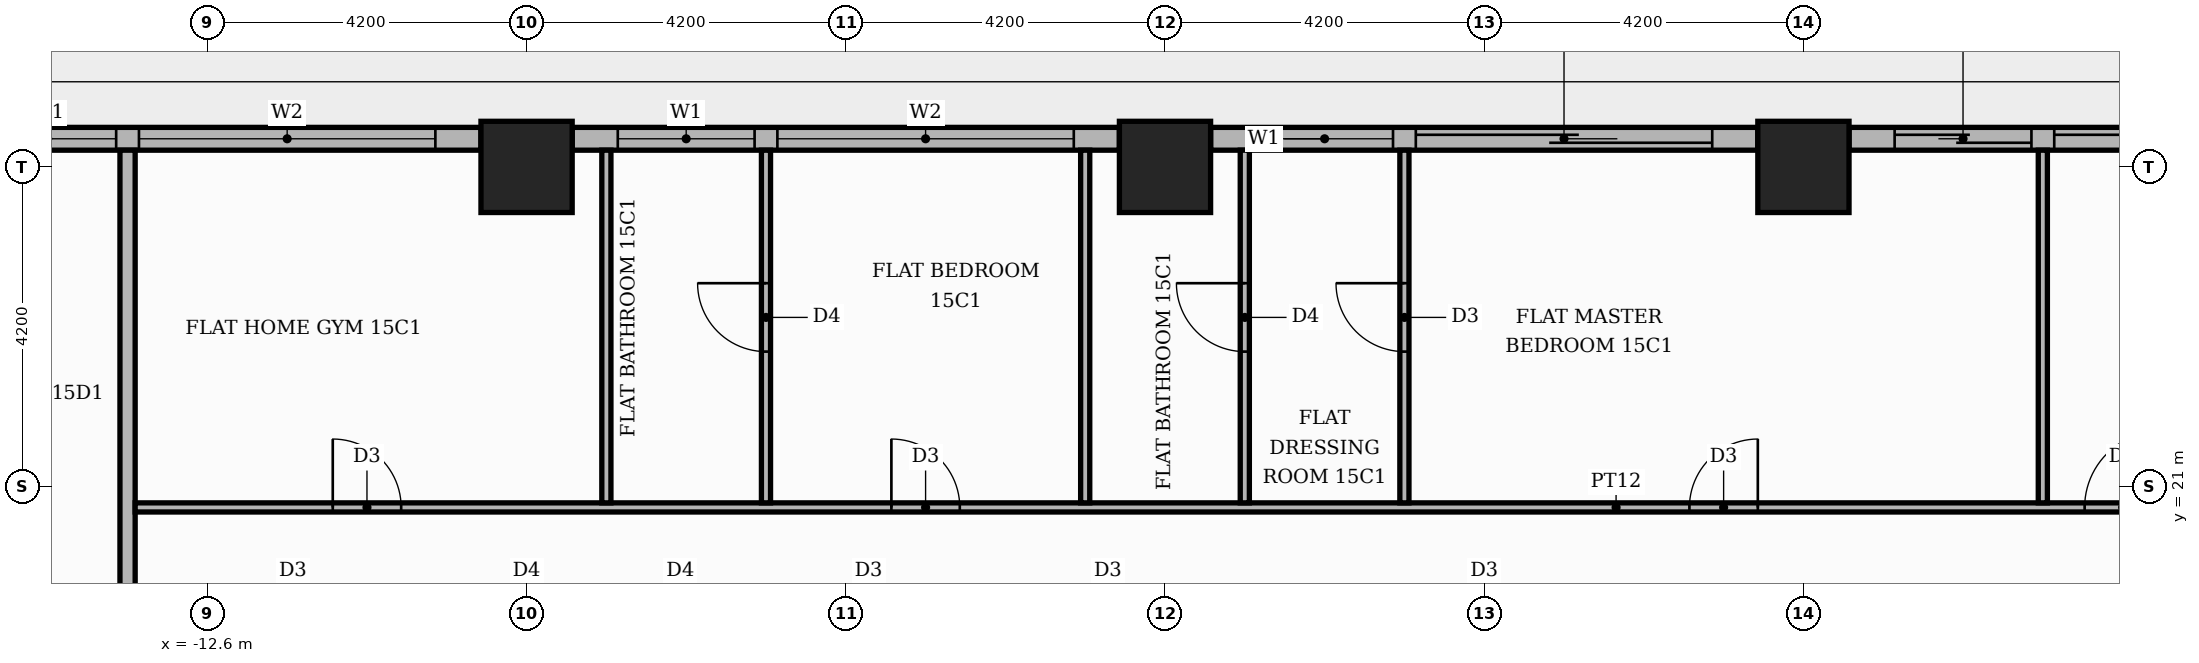
"""IFC4 building model, lengths in metres.
Left out: names, types, materials, properties, quantities, classifications, styles, units other than length and angle.
Written with IfcOpenShell. Run it as: python <this file> out.ifc"""

import sys

from ifc_helpers import new_model, si_unit, direction, frame, frame_2d, origin, origin_2d, place, context, subcontext, project, spatial, rectangle, extrude, element, fill, save


model = new_model("IFC4")
c1 = context("Model", 3, precision=1e-05, world=origin(), true_north=direction((0.0, 1.0)))
c2 = subcontext(c1, "Body", "Model", "MODEL_VIEW")
j1 = project(units=[si_unit("LENGTHUNIT", "METRE"), si_unit("PLANEANGLEUNIT", "RADIAN")], contexts=[c1])
p1 = place(None, origin())
s1 = spatial("IfcSite", under=j1, at=p1, CompositionType="ELEMENT")
p2 = place(p1, origin())
s2 = spatial("IfcBuilding", under=s1, at=p2, CompositionType="ELEMENT")
p3 = place(p2, frame((0.0, 0.0, 66.0)))
s3 = spatial("IfcBuildingStorey", under=s2, at=p3, CompositionType="ELEMENT", Elevation=66.0)
for number, where, z_axis, x_axis in (
    (1, (0.0, 25.2, 0.0), (0.0, 0.0, 1.0), (1.0, 0.0, 0.0)),
    (2, (-8.4, 25.2, 0.0), (0.0, 0.0, 1.0), (1.0, 0.0, 0.0)),
    (3, (8.4, 25.2, 0.0), (0.0, 0.0, 1.0), (1.0, 0.0, 0.0)),
):
    element("IfcColumn", number, at=place(p3, frame(where, z_axis=z_axis, x_axis=x_axis)), inside=s3, PredefinedType="COLUMN", context=c2, shape_type="SweptSolid", body=[
        extrude(rectangle(XDim=1.2, YDim=1.2, at=origin_2d()), origin(), (0.0, 0.0, 1.0), 3.9),
    ])
p4 = place(p3, frame((16.2, 25.57, 0.0), z_axis=(0.0, 0.0, 1.0), x_axis=(-1.0, 0.0, 0.0)))
e4 = element("IfcWall", 4, at=p4, inside=s3, PredefinedType="STANDARD", context=c2, shape_type="SweptSolid", body=[
    extrude(rectangle(XDim=7.2, YDim=0.3, at=frame_2d((3.6, 0.0))), origin(), (0.0, 0.0, 1.0), 3.48),
])
p5 = place(p4, frame((0.6, 0.0, 0.0)))
e5 = element("IfcOpeningElement", 5, at=p5, cuts=e4, PredefinedType="OPENING", context=c2, shape_type="SweptSolid", body=[
    extrude(rectangle(XDim=3.9, YDim=2.4, at=frame_2d((1.95, 1.2))), frame((0.0, 0.16, 0.0), z_axis=(0.0, -1.0, 0.0), x_axis=(1.0, 0.0, 0.0)), (0.0, 0.0, 1.0), 0.32),
])
p6 = place(p4, frame((4.8, 0.0, 0.0)))
e6 = element("IfcOpeningElement", 6, at=p6, cuts=e4, PredefinedType="OPENING", context=c2, shape_type="SweptSolid", body=[
    extrude(rectangle(XDim=1.8, YDim=2.4, at=frame_2d((0.9, 1.2))), frame((0.0, 0.16, 0.0), z_axis=(0.0, -1.0, 0.0), x_axis=(1.0, 0.0, 0.0)), (0.0, 0.0, 1.0), 0.32),
])
p7 = place(p3, frame((7.8, 25.57, 0.0), z_axis=(0.0, 0.0, 1.0), x_axis=(-1.0, 0.0, 0.0)))
e7 = element("IfcWall", 7, at=p7, inside=s3, PredefinedType="STANDARD", context=c2, shape_type="SweptSolid", body=[
    extrude(rectangle(XDim=7.2, YDim=0.3, at=frame_2d((3.6, 0.0))), origin(), (0.0, 0.0, 1.0), 3.48),
])
p8 = place(p7, frame((0.6, 0.0, 0.0)))
e8 = element("IfcOpeningElement", 8, at=p8, cuts=e7, PredefinedType="OPENING", context=c2, shape_type="SweptSolid", body=[
    extrude(rectangle(XDim=3.9, YDim=2.4, at=frame_2d((1.95, 1.2))), frame((0.0, 0.16, 0.0), z_axis=(0.0, -1.0, 0.0), x_axis=(1.0, 0.0, 0.0)), (0.0, 0.0, 1.0), 0.32),
])
p9 = place(p7, frame((4.8, 0.0, 0.9)))
e9 = element("IfcOpeningElement", 9, at=p9, cuts=e7, PredefinedType="OPENING", context=c2, shape_type="SweptSolid", body=[
    extrude(rectangle(XDim=1.8, YDim=2.1, at=frame_2d((0.9, 1.05))), frame((0.0, 0.16, 0.0), z_axis=(0.0, -1.0, 0.0), x_axis=(1.0, 0.0, 0.0)), (0.0, 0.0, 1.0), 0.32),
])
p10 = place(p3, frame((-0.6, 25.57, 0.0), z_axis=(0.0, 0.0, 1.0), x_axis=(-1.0, 0.0, 0.0)))
e10 = element("IfcWall", 10, at=p10, inside=s3, PredefinedType="STANDARD", context=c2, shape_type="SweptSolid", body=[
    extrude(rectangle(XDim=7.2, YDim=0.3, at=frame_2d((3.6, 0.0))), origin(), (0.0, 0.0, 1.0), 3.48),
])
p11 = place(p10, frame((0.6, 0.0, 0.9)))
e11 = element("IfcOpeningElement", 11, at=p11, cuts=e10, PredefinedType="OPENING", context=c2, shape_type="SweptSolid", body=[
    extrude(rectangle(XDim=3.9, YDim=2.1, at=frame_2d((1.95, 1.05))), frame((0.0, 0.16, 0.0), z_axis=(0.0, -1.0, 0.0), x_axis=(1.0, 0.0, 0.0)), (0.0, 0.0, 1.0), 0.32),
])
p12 = place(p10, frame((4.8, 0.0, 0.9)))
e12 = element("IfcOpeningElement", 12, at=p12, cuts=e10, PredefinedType="OPENING", context=c2, shape_type="SweptSolid", body=[
    extrude(rectangle(XDim=1.8, YDim=2.1, at=frame_2d((0.9, 1.05))), frame((0.0, 0.16, 0.0), z_axis=(0.0, -1.0, 0.0), x_axis=(1.0, 0.0, 0.0)), (0.0, 0.0, 1.0), 0.32),
])
p13 = place(p3, frame((-9.0, 25.57, 0.0), z_axis=(0.0, 0.0, 1.0), x_axis=(-1.0, 0.0, 0.0)))
e13 = element("IfcWall", 13, at=p13, inside=s3, PredefinedType="STANDARD", context=c2, shape_type="SweptSolid", body=[
    extrude(rectangle(XDim=7.2, YDim=0.3, at=frame_2d((3.6, 0.0))), origin(), (0.0, 0.0, 1.0), 3.48),
])
p14 = place(p13, frame((0.6, 0.0, 0.9)))
e14 = element("IfcOpeningElement", 14, at=p14, cuts=e13, PredefinedType="OPENING", context=c2, shape_type="SweptSolid", body=[
    extrude(rectangle(XDim=3.9, YDim=2.1, at=frame_2d((1.95, 1.05))), frame((0.0, 0.16, 0.0), z_axis=(0.0, -1.0, 0.0), x_axis=(1.0, 0.0, 0.0)), (0.0, 0.0, 1.0), 0.32),
])
p15 = place(p13, frame((4.8, 0.0, 0.9)))
e15 = element("IfcOpeningElement", 15, at=p15, cuts=e13, PredefinedType="OPENING", context=c2, shape_type="SweptSolid", body=[
    extrude(rectangle(XDim=1.8, YDim=2.1, at=frame_2d((0.9, 1.05))), frame((0.0, 0.16, 0.0), z_axis=(0.0, -1.0, 0.0), x_axis=(1.0, 0.0, 0.0)), (0.0, 0.0, 1.0), 0.32),
])
p16 = place(p3, frame((-13.65, 13.75, 0.0), z_axis=(0.0, 0.0, 1.0), x_axis=(0.0, 1.0, 0.0)))
e16 = element("IfcWall", 16, at=p16, inside=s3, PredefinedType="PARTITIONING", context=c2, shape_type="SweptSolid", body=[
    extrude(rectangle(XDim=11.67, YDim=0.2, at=frame_2d((5.835, 0.0))), origin(), (0.0, 0.0, 1.0), 3.48),
])
p17 = place(p3, frame((-13.55, 20.72, 0.0), z_axis=(0.0, 0.0, 1.0), x_axis=(1.0, 0.0, 0.0)))
e17 = element("IfcWall", 17, at=p17, inside=s3, PredefinedType="PARTITIONING", context=c2, shape_type="SweptSolid", body=[
    extrude(rectangle(XDim=38.97, YDim=0.12, at=frame_2d((19.485, 0.0))), origin(), (0.0, 0.0, 1.0), 3.48),
])
p18 = place(p17, frame((25.65, 0.0, 0.0)))
e18 = element("IfcOpeningElement", 18, at=p18, cuts=e17, PredefinedType="OPENING", context=c2, shape_type="SweptSolid", body=[
    extrude(rectangle(XDim=1.0, YDim=2.1, at=frame_2d((0.5, 1.05))), frame((0.0, 0.07, 0.0), z_axis=(0.0, -1.0, 0.0), x_axis=(1.0, 0.0, 0.0)), (0.0, 0.0, 1.0), 0.14),
])
p19 = place(p17, frame((20.45, 0.0, 0.0)))
e19 = element("IfcOpeningElement", 19, at=p19, cuts=e17, PredefinedType="OPENING", context=c2, shape_type="SweptSolid", body=[
    extrude(rectangle(XDim=0.9, YDim=2.1, at=frame_2d((0.45, 1.05))), frame((0.0, 0.07, 0.0), z_axis=(0.0, -1.0, 0.0), x_axis=(1.0, 0.0, 0.0)), (0.0, 0.0, 1.0), 0.14),
])
p20 = place(p17, frame((9.95, 0.0, 0.0)))
e20 = element("IfcOpeningElement", 20, at=p20, cuts=e17, PredefinedType="OPENING", context=c2, shape_type="SweptSolid", body=[
    extrude(rectangle(XDim=0.9, YDim=2.1, at=frame_2d((0.45, 1.05))), frame((0.0, 0.07, 0.0), z_axis=(0.0, -1.0, 0.0), x_axis=(1.0, 0.0, 0.0)), (0.0, 0.0, 1.0), 0.14),
])
p21 = place(p17, frame((2.6, 0.0, 0.0)))
e21 = element("IfcOpeningElement", 21, at=p21, cuts=e17, PredefinedType="OPENING", context=c2, shape_type="SweptSolid", body=[
    extrude(rectangle(XDim=0.9, YDim=2.1, at=frame_2d((0.45, 1.05))), frame((0.0, 0.07, 0.0), z_axis=(0.0, -1.0, 0.0), x_axis=(1.0, 0.0, 0.0)), (0.0, 0.0, 1.0), 0.14),
])
p22 = place(p3, frame((-7.35, 20.78, 0.0), z_axis=(0.0, 0.0, 1.0), x_axis=(0.0, 1.0, 0.0)))
e22 = element("IfcWall", 22, at=p22, inside=s3, PredefinedType="PARTITIONING", context=c2, shape_type="SweptSolid", body=[
    extrude(rectangle(XDim=4.64, YDim=0.12, at=frame_2d((2.32, 0.0))), origin(), (0.0, 0.0, 1.0), 3.48),
])
p23 = place(p3, frame((-5.25, 20.78, 0.0), z_axis=(0.0, 0.0, 1.0), x_axis=(0.0, 1.0, 0.0)))
e23 = element("IfcWall", 23, at=p23, inside=s3, PredefinedType="PARTITIONING", context=c2, shape_type="SweptSolid", body=[
    extrude(rectangle(XDim=4.64, YDim=0.12, at=frame_2d((2.32, 0.0))), origin(), (0.0, 0.0, 1.0), 3.48),
])
p24 = place(p23, frame((1.99, 0.0, 0.0)))
e24 = element("IfcOpeningElement", 24, at=p24, cuts=e23, PredefinedType="OPENING", context=c2, shape_type="SweptSolid", body=[
    extrude(rectangle(XDim=0.9, YDim=2.1, at=frame_2d((0.45, 1.05))), frame((0.0, 0.07, 0.0), z_axis=(0.0, -1.0, 0.0), x_axis=(1.0, 0.0, 0.0)), (0.0, 0.0, 1.0), 0.14),
])
p25 = place(p3, frame((-1.05, 20.78, 0.0), z_axis=(0.0, 0.0, 1.0), x_axis=(0.0, 1.0, 0.0)))
e25 = element("IfcWall", 25, at=p25, inside=s3, PredefinedType="PARTITIONING", context=c2, shape_type="SweptSolid", body=[
    extrude(rectangle(XDim=4.64, YDim=0.12, at=frame_2d((2.32, 0.0))), origin(), (0.0, 0.0, 1.0), 3.48),
])
p26 = place(p3, frame((1.05, 20.78, 0.0), z_axis=(0.0, 0.0, 1.0), x_axis=(0.0, 1.0, 0.0)))
e26 = element("IfcWall", 26, at=p26, inside=s3, PredefinedType="PARTITIONING", context=c2, shape_type="SweptSolid", body=[
    extrude(rectangle(XDim=4.64, YDim=0.12, at=frame_2d((2.32, 0.0))), origin(), (0.0, 0.0, 1.0), 3.48),
])
p27 = place(p26, frame((1.99, 0.0, 0.0)))
e27 = element("IfcOpeningElement", 27, at=p27, cuts=e26, PredefinedType="OPENING", context=c2, shape_type="SweptSolid", body=[
    extrude(rectangle(XDim=0.9, YDim=2.1, at=frame_2d((0.45, 1.05))), frame((0.0, 0.07, 0.0), z_axis=(0.0, -1.0, 0.0), x_axis=(1.0, 0.0, 0.0)), (0.0, 0.0, 1.0), 0.14),
])
p28 = place(p3, frame((3.15, 20.78, 0.0), z_axis=(0.0, 0.0, 1.0), x_axis=(0.0, 1.0, 0.0)))
e28 = element("IfcWall", 28, at=p28, inside=s3, PredefinedType="PARTITIONING", context=c2, shape_type="SweptSolid", body=[
    extrude(rectangle(XDim=4.64, YDim=0.12, at=frame_2d((2.32, 0.0))), origin(), (0.0, 0.0, 1.0), 3.48),
])
p29 = place(p28, frame((1.99, 0.0, 0.0)))
e29 = element("IfcOpeningElement", 29, at=p29, cuts=e28, PredefinedType="OPENING", context=c2, shape_type="SweptSolid", body=[
    extrude(rectangle(XDim=0.9, YDim=2.1, at=frame_2d((0.45, 1.05))), frame((0.0, 0.07, 0.0), z_axis=(0.0, -1.0, 0.0), x_axis=(1.0, 0.0, 0.0)), (0.0, 0.0, 1.0), 0.14),
])
p30 = place(p3, frame((11.55, 20.78, 0.0), z_axis=(0.0, 0.0, 1.0), x_axis=(0.0, 1.0, 0.0)))
e30 = element("IfcWall", 30, at=p30, inside=s3, PredefinedType="PARTITIONING", context=c2, shape_type="SweptSolid", body=[
    extrude(rectangle(XDim=4.64, YDim=0.12, at=frame_2d((2.32, 0.0))), origin(), (0.0, 0.0, 1.0), 3.48),
])
p31 = place(p5, origin())
e31 = element("IfcDoor", 31, at=p31, inside=s3, OperationType="SLIDING_TO_LEFT", PredefinedType="DOOR", context=c2, shape_type="SweptSolid", body=[
    extrude(rectangle(XDim=3.9, YDim=2.4, at=frame_2d((1.95, 1.2))), frame((0.0, 0.025, 0.0), z_axis=(0.0, -1.0, 0.0), x_axis=(1.0, 0.0, 0.0)), (0.0, 0.0, 1.0), 0.05),
])
fill(e5, e31)
p32 = place(p6, origin())
e32 = element("IfcDoor", 32, at=p32, inside=s3, OperationType="SLIDING_TO_RIGHT", PredefinedType="DOOR", context=c2, shape_type="SweptSolid", body=[
    extrude(rectangle(XDim=1.8, YDim=2.4, at=frame_2d((0.9, 1.2))), frame((0.0, 0.025, 0.0), z_axis=(0.0, -1.0, 0.0), x_axis=(1.0, 0.0, 0.0)), (0.0, 0.0, 1.0), 0.05),
])
fill(e6, e32)
p33 = place(p8, origin())
e33 = element("IfcDoor", 33, at=p33, inside=s3, OperationType="SLIDING_TO_LEFT", PredefinedType="DOOR", context=c2, shape_type="SweptSolid", body=[
    extrude(rectangle(XDim=3.9, YDim=2.4, at=frame_2d((1.95, 1.2))), frame((0.0, 0.025, 0.0), z_axis=(0.0, -1.0, 0.0), x_axis=(1.0, 0.0, 0.0)), (0.0, 0.0, 1.0), 0.05),
])
fill(e8, e33)
p34 = place(p9, origin())
e34 = element("IfcWindow", 34, at=p34, inside=s3, PartitioningType="SINGLE_PANEL", PredefinedType="WINDOW", context=c2, shape_type="SweptSolid", body=[
    extrude(rectangle(XDim=1.8, YDim=2.1, at=frame_2d((0.9, 1.05))), frame((0.0, 0.03, 0.0), z_axis=(0.0, -1.0, 0.0), x_axis=(1.0, 0.0, 0.0)), (0.0, 0.0, 1.0), 0.06),
])
fill(e9, e34)
p35 = place(p11, origin())
e35 = element("IfcWindow", 35, at=p35, inside=s3, PartitioningType="SINGLE_PANEL", PredefinedType="WINDOW", context=c2, shape_type="SweptSolid", body=[
    extrude(rectangle(XDim=3.9, YDim=2.1, at=frame_2d((1.95, 1.05))), frame((0.0, 0.03, 0.0), z_axis=(0.0, -1.0, 0.0), x_axis=(1.0, 0.0, 0.0)), (0.0, 0.0, 1.0), 0.06),
])
fill(e11, e35)
p36 = place(p12, origin())
e36 = element("IfcWindow", 36, at=p36, inside=s3, PartitioningType="SINGLE_PANEL", PredefinedType="WINDOW", context=c2, shape_type="SweptSolid", body=[
    extrude(rectangle(XDim=1.8, YDim=2.1, at=frame_2d((0.9, 1.05))), frame((0.0, 0.03, 0.0), z_axis=(0.0, -1.0, 0.0), x_axis=(1.0, 0.0, 0.0)), (0.0, 0.0, 1.0), 0.06),
])
fill(e12, e36)
p37 = place(p14, origin())
e37 = element("IfcWindow", 37, at=p37, inside=s3, PartitioningType="SINGLE_PANEL", PredefinedType="WINDOW", context=c2, shape_type="SweptSolid", body=[
    extrude(rectangle(XDim=3.9, YDim=2.1, at=frame_2d((1.95, 1.05))), frame((0.0, 0.03, 0.0), z_axis=(0.0, -1.0, 0.0), x_axis=(1.0, 0.0, 0.0)), (0.0, 0.0, 1.0), 0.06),
])
fill(e14, e37)
p38 = place(p15, origin())
e38 = element("IfcWindow", 38, at=p38, inside=s3, PartitioningType="SINGLE_PANEL", PredefinedType="WINDOW", context=c2, shape_type="SweptSolid", body=[
    extrude(rectangle(XDim=1.8, YDim=2.1, at=frame_2d((0.9, 1.05))), frame((0.0, 0.03, 0.0), z_axis=(0.0, -1.0, 0.0), x_axis=(1.0, 0.0, 0.0)), (0.0, 0.0, 1.0), 0.06),
])
fill(e15, e38)
p39 = place(p18, origin())
e39 = element("IfcDoor", 39, at=p39, inside=s3, OperationType="SINGLE_SWING_RIGHT", PredefinedType="DOOR", context=c2, shape_type="SweptSolid", body=[
    extrude(rectangle(XDim=1.0, YDim=2.1, at=frame_2d((0.5, 1.05))), frame((0.0, 0.025, 0.0), z_axis=(0.0, -1.0, 0.0), x_axis=(1.0, 0.0, 0.0)), (0.0, 0.0, 1.0), 0.05),
])
fill(e18, e39)
p40 = place(p19, origin())
e40 = element("IfcDoor", 40, at=p40, inside=s3, OperationType="SINGLE_SWING_RIGHT", PredefinedType="DOOR", context=c2, shape_type="SweptSolid", body=[
    extrude(rectangle(XDim=0.9, YDim=2.1, at=frame_2d((0.45, 1.05))), frame((0.0, 0.025, 0.0), z_axis=(0.0, -1.0, 0.0), x_axis=(1.0, 0.0, 0.0)), (0.0, 0.0, 1.0), 0.05),
])
fill(e19, e40)
p41 = place(p29, origin())
e41 = element("IfcDoor", 41, at=p41, inside=s3, OperationType="SINGLE_SWING_RIGHT", PredefinedType="DOOR", context=c2, shape_type="SweptSolid", body=[
    extrude(rectangle(XDim=0.9, YDim=2.1, at=frame_2d((0.45, 1.05))), frame((0.0, 0.025, 0.0), z_axis=(0.0, -1.0, 0.0), x_axis=(1.0, 0.0, 0.0)), (0.0, 0.0, 1.0), 0.05),
])
fill(e29, e41)
p42 = place(p27, origin())
e42 = element("IfcDoor", 42, at=p42, inside=s3, OperationType="SINGLE_SWING_RIGHT", PredefinedType="DOOR", context=c2, shape_type="SweptSolid", body=[
    extrude(rectangle(XDim=0.9, YDim=2.1, at=frame_2d((0.45, 1.05))), frame((0.0, 0.025, 0.0), z_axis=(0.0, -1.0, 0.0), x_axis=(1.0, 0.0, 0.0)), (0.0, 0.0, 1.0), 0.05),
])
fill(e27, e42)
p43 = place(p20, origin())
e43 = element("IfcDoor", 43, at=p43, inside=s3, OperationType="SINGLE_SWING_LEFT", PredefinedType="DOOR", context=c2, shape_type="SweptSolid", body=[
    extrude(rectangle(XDim=0.9, YDim=2.1, at=frame_2d((0.45, 1.05))), frame((0.0, 0.025, 0.0), z_axis=(0.0, -1.0, 0.0), x_axis=(1.0, 0.0, 0.0)), (0.0, 0.0, 1.0), 0.05),
])
fill(e20, e43)
p44 = place(p24, origin())
e44 = element("IfcDoor", 44, at=p44, inside=s3, OperationType="SINGLE_SWING_RIGHT", PredefinedType="DOOR", context=c2, shape_type="SweptSolid", body=[
    extrude(rectangle(XDim=0.9, YDim=2.1, at=frame_2d((0.45, 1.05))), frame((0.0, 0.025, 0.0), z_axis=(0.0, -1.0, 0.0), x_axis=(1.0, 0.0, 0.0)), (0.0, 0.0, 1.0), 0.05),
])
fill(e24, e44)
p45 = place(p21, origin())
e45 = element("IfcDoor", 45, at=p45, inside=s3, OperationType="SINGLE_SWING_LEFT", PredefinedType="DOOR", context=c2, shape_type="SweptSolid", body=[
    extrude(rectangle(XDim=0.9, YDim=2.1, at=frame_2d((0.45, 1.05))), frame((0.0, 0.025, 0.0), z_axis=(0.0, -1.0, 0.0), x_axis=(1.0, 0.0, 0.0)), (0.0, 0.0, 1.0), 0.05),
])
fill(e21, e45)
save(model, sys.argv[1])
